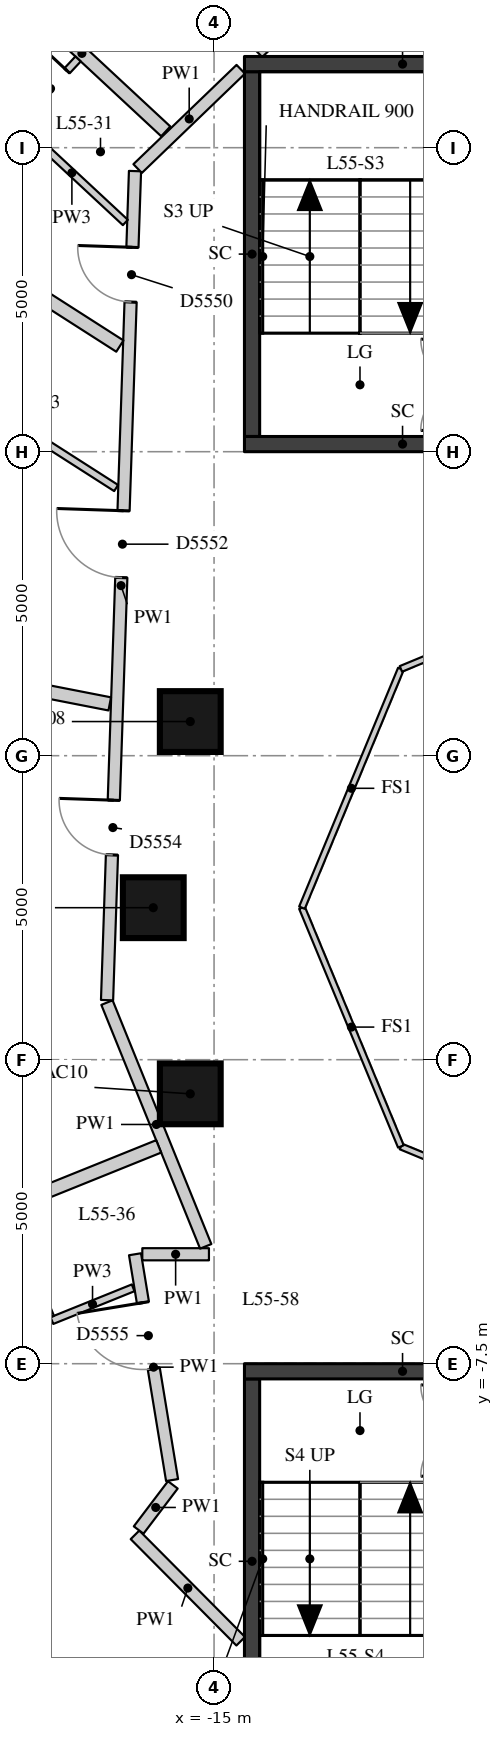
"""IFC4 building model, lengths in metres.
Left out: names, types, materials, properties, quantities, classifications, styles, units other than length and angle.
Written with IfcOpenShell. Run it as: python <this file> out.ifc"""

import sys

from ifc_helpers import new_model, si_unit, direction, frame, frame_2d, origin, origin_2d, place, context, subcontext, project, spatial, rectangle, extrude, element, fill, save


model = new_model("IFC4")
c1 = context("Model", 3, precision=1e-05, world=origin(), true_north=direction((0.0, 1.0)))
c2 = subcontext(c1, "Body", "Model", "MODEL_VIEW")
j1 = project(units=[si_unit("LENGTHUNIT", "METRE"), si_unit("PLANEANGLEUNIT", "RADIAN")], contexts=[c1])
p1 = place(None, origin())
s1 = spatial("IfcSite", under=j1, at=p1, CompositionType="ELEMENT")
p2 = place(p1, origin())
s2 = spatial("IfcBuilding", under=s1, at=p2, CompositionType="ELEMENT")
p3 = place(p2, frame((0.0, 0.0, 195.8)))
s3 = spatial("IfcBuildingStorey", under=s2, at=p3, CompositionType="ELEMENT", Elevation=195.8)
for number, where, z_axis, x_axis in (
    (1, (-15.391, 3.062, 0.0), (0.0, 0.0, 1.0), (1.0, 0.0, 0.0)),
    (2, (-16.0, 0.0, 0.0), (0.0, 0.0, 1.0), (1.0, 0.0, 0.0)),
    (3, (-15.391, -3.062, 0.0), (0.0, 0.0, 1.0), (1.0, 0.0, 0.0)),
):
    element("IfcColumn", number, at=place(p3, frame(where, z_axis=z_axis, x_axis=x_axis)), inside=s3, PredefinedType="COLUMN", context=c2, shape_type="SweptSolid", body=[
        extrude(rectangle(XDim=1.0, YDim=1.0, at=origin_2d()), origin(), (0.0, 0.0, 1.0), 3.3),
    ])
p4 = place(p3, frame((-14.375, 7.75, -0.28), z_axis=(0.0, 0.0, 1.0), x_axis=(0.0, 1.0, 0.0)))
e4 = element("IfcWall", 4, at=p4, inside=s3, PredefinedType="SHEAR", context=c2, shape_type="SweptSolid", body=[
    extrude(rectangle(XDim=6.0, YDim=0.25, at=frame_2d((3.0, 0.0))), origin(), (0.0, 0.0, 1.0), 3.3),
])
for number, where, z_axis, x_axis in (
    (5, (-14.5, 13.875, -0.28), (0.0, 0.0, 1.0), (1.0, 0.0, 0.0)),
    (6, (-14.5, 7.625, -0.28), (0.0, 0.0, 1.0), (1.0, 0.0, 0.0)),
):
    element("IfcWall", number, at=place(p3, frame(where, z_axis=z_axis, x_axis=x_axis)), inside=s3, PredefinedType="SHEAR", context=c2, shape_type="SweptSolid", body=[
        extrude(rectangle(XDim=5.2, YDim=0.25, at=frame_2d((2.6, 0.0))), origin(), (0.0, 0.0, 1.0), 3.3),
    ])
p5 = place(p3, frame((-14.375, -13.75, -0.28), z_axis=(0.0, 0.0, 1.0), x_axis=(0.0, 1.0, 0.0)))
e7 = element("IfcWall", 7, at=p5, inside=s3, PredefinedType="SHEAR", context=c2, shape_type="SweptSolid", body=[
    extrude(rectangle(XDim=6.0, YDim=0.25, at=frame_2d((3.0, 0.0))), origin(), (0.0, 0.0, 1.0), 3.3),
])
p6 = place(p3, frame((-14.5, -7.625, -0.28), z_axis=(0.0, 0.0, 1.0), x_axis=(1.0, 0.0, 0.0)))
e8 = element("IfcWall", 8, at=p6, inside=s3, PredefinedType="SHEAR", context=c2, shape_type="SweptSolid", body=[
    extrude(rectangle(XDim=5.2, YDim=0.25, at=frame_2d((2.6, 0.0))), origin(), (0.0, 0.0, 1.0), 3.3),
])
p7 = place(p3, frame((-14.562, -12.064, 0.0), z_axis=(0.0, 0.0, 1.0), x_axis=(-0.704826289083, 0.709379942074, 0.0)))
e9 = element("IfcWall", 9, at=p7, inside=s3, PredefinedType="PARTITIONING", context=c2, shape_type="SweptSolid", body=[
    extrude(rectangle(XDim=2.466, YDim=0.2, at=frame_2d((1.233, 0.0))), origin(), (0.0, 0.0, 1.0), 3.02),
])
p8 = place(p3, frame((-16.24, -10.236, 0.0), z_axis=(0.0, 0.0, 1.0), x_axis=(0.60389301212, 0.797065386222, 0.0)))
e10 = element("IfcWall", 10, at=p8, inside=s3, PredefinedType="PARTITIONING", context=c2, shape_type="SweptSolid", body=[
    extrude(rectangle(XDim=0.931, YDim=0.2, at=frame_2d((0.466, 0.0))), origin(), (0.0, 0.0, 1.0), 3.02),
])
p9 = place(p3, frame((-15.69, -9.414, 0.0), z_axis=(0.0, 0.0, 1.0), x_axis=(-0.161968669214, 0.986795900981, 0.0)))
e11 = element("IfcWall", 11, at=p9, inside=s3, PredefinedType="PARTITIONING", context=c2, shape_type="SweptSolid", body=[
    extrude(rectangle(XDim=3.764, YDim=0.2, at=frame_2d((1.882, 0.0))), origin(), (0.0, 0.0, 1.0), 3.02),
])
p10 = place(p9, frame((1.858, 0.0, 0.0)))
e12 = element("IfcOpeningElement", 12, at=p10, cuts=e11, PredefinedType="OPENING", context=c2, shape_type="SweptSolid", body=[
    extrude(rectangle(XDim=1.1, YDim=2.1, at=frame_2d((0.55, 1.05))), frame((0.0, 0.11, 0.0), z_axis=(0.0, -1.0, 0.0), x_axis=(1.0, 0.0, 0.0)), (0.0, 0.0, 1.0), 0.22),
])
p11 = place(p3, frame((-16.18, -5.7, 0.0), z_axis=(0.0, 0.0, 1.0), x_axis=(1.0, 0.0, 0.0)))
e13 = element("IfcWall", 13, at=p11, inside=s3, PredefinedType="PARTITIONING", context=c2, shape_type="SweptSolid", body=[
    extrude(rectangle(XDim=1.096, YDim=0.2, at=frame_2d((0.548, 0.0))), origin(), (0.0, 0.0, 1.0), 3.02),
])
p12 = place(p3, frame((-15.137, -5.57, 0.0), z_axis=(0.0, 0.0, 1.0), x_axis=(-0.375464059939, 0.926836954213, 0.0)))
e14 = element("IfcWall", 14, at=p12, inside=s3, PredefinedType="PARTITIONING", context=c2, shape_type="SweptSolid", body=[
    extrude(rectangle(XDim=4.326, YDim=0.2, at=frame_2d((2.163, 0.0))), origin(), (0.0, 0.0, 1.0), 3.02),
])
p13 = place(p3, frame((-16.76, -1.521, 0.0), z_axis=(0.0, 0.0, 1.0), x_axis=(0.033695560079, 0.999432143385, 0.0)))
e15 = element("IfcWall", 15, at=p13, inside=s3, PredefinedType="PARTITIONING", context=c2, shape_type="SweptSolid", body=[
    extrude(rectangle(XDim=13.643, YDim=0.2, at=frame_2d((6.822, 0.0))), origin(), (0.0, 0.0, 1.0), 3.02),
])
p14 = place(p13, frame((11.489, 0.0, 0.0)))
e16 = element("IfcOpeningElement", 16, at=p14, cuts=e15, PredefinedType="OPENING", context=c2, shape_type="SweptSolid", body=[
    extrude(rectangle(XDim=0.9, YDim=2.1, at=frame_2d((0.45, 1.05))), frame((0.0, 0.11, 0.0), z_axis=(0.0, -1.0, 0.0), x_axis=(1.0, 0.0, 0.0)), (0.0, 0.0, 1.0), 0.22),
])
p15 = place(p13, frame((6.954, 0.0, 0.0)))
e17 = element("IfcOpeningElement", 17, at=p15, cuts=e15, PredefinedType="OPENING", context=c2, shape_type="SweptSolid", body=[
    extrude(rectangle(XDim=1.1, YDim=2.1, at=frame_2d((0.55, 1.05))), frame((0.0, 0.11, 0.0), z_axis=(0.0, -1.0, 0.0), x_axis=(1.0, 0.0, 0.0)), (0.0, 0.0, 1.0), 0.22),
])
p16 = place(p13, frame((2.39, 0.0, 0.0)))
e18 = element("IfcOpeningElement", 18, at=p16, cuts=e15, PredefinedType="OPENING", context=c2, shape_type="SweptSolid", body=[
    extrude(rectangle(XDim=0.9, YDim=2.1, at=frame_2d((0.45, 1.05))), frame((0.0, 0.11, 0.0), z_axis=(0.0, -1.0, 0.0), x_axis=(1.0, 0.0, 0.0)), (0.0, 0.0, 1.0), 0.22),
])
p17 = place(p3, frame((-16.257, 12.157, 0.0), z_axis=(0.0, 0.0, 1.0), x_axis=(0.720356671174, 0.693603825174, 0.0)))
e19 = element("IfcWall", 19, at=p17, inside=s3, PredefinedType="PARTITIONING", context=c2, shape_type="SweptSolid", body=[
    extrude(rectangle(XDim=2.354, YDim=0.2, at=frame_2d((1.177, 0.0))), origin(), (0.0, 0.0, 1.0), 3.02),
])
p18 = place(p3, frame((-14.278, 14.062, 0.0), z_axis=(0.0, 0.0, 1.0), x_axis=(0.720213092954, 0.693752910435, 0.0)))
e20 = element("IfcWall", 20, at=p18, inside=s3, PredefinedType="PARTITIONING", context=c2, shape_type="SweptSolid", body=[
    extrude(rectangle(XDim=1.476, YDim=0.2, at=frame_2d((0.738, 0.0))), origin(), (0.0, 0.0, 1.0), 3.02),
])
p19 = place(p3, frame((-18.553, 15.334, 0.0), z_axis=(0.0, 0.0, 1.0), x_axis=(0.732303975018, -0.680977891105, 0.0)))
e21 = element("IfcWall", 21, at=p19, inside=s3, PredefinedType="PARTITIONING", context=c2, shape_type="SweptSolid", body=[
    extrude(rectangle(XDim=3.767, YDim=0.22, at=frame_2d((1.884, 0.0))), origin(), (0.0, 0.0, 1.0), 2.57),
])
p20 = place(p3, frame((-21.055, 12.121, 0.0), z_axis=(0.0, 0.0, 1.0), x_axis=(0.842281345898, -0.539038156675, 0.0)))
e22 = element("IfcWall", 22, at=p20, inside=s3, PredefinedType="PARTITIONING", context=c2, shape_type="SweptSolid", body=[
    extrude(rectangle(XDim=5.35, YDim=0.22, at=frame_2d((2.675, 0.0))), origin(), (0.0, 0.0, 1.0), 3.02),
])
p21 = place(p3, frame((-22.697, 4.521, 0.0), z_axis=(0.0, 0.0, 1.0), x_axis=(0.981441525081, -0.19176165635, 0.0)))
e23 = element("IfcWall", 23, at=p21, inside=s3, PredefinedType="PARTITIONING", context=c2, shape_type="SweptSolid", body=[
    extrude(rectangle(XDim=6.094, YDim=0.22, at=frame_2d((3.047, 0.0))), origin(), (0.0, 0.0, 1.0), 2.47),
])
p22 = place(p3, frame((-21.651, -6.241, 0.0), z_axis=(0.0, 0.0, 1.0), x_axis=(0.927381885483, 0.374116076208, 0.0)))
e24 = element("IfcWall", 24, at=p22, inside=s3, PredefinedType="PARTITIONING", context=c2, shape_type="SweptSolid", body=[
    extrude(rectangle(XDim=6.19, YDim=0.22, at=frame_2d((3.095, 0.0))), origin(), (0.0, 0.0, 1.0), 3.02),
])
p23 = place(p3, frame((-16.459, 11.27, 0.0), z_axis=(0.0, 0.0, 1.0), x_axis=(-0.732311710068, 0.68096957296, 0.0)))
e25 = element("IfcWall", 25, at=p23, inside=s3, PredefinedType="PARTITIONING", context=c2, shape_type="SweptSolid", body=[
    extrude(rectangle(XDim=2.401, YDim=0.12, at=frame_2d((1.201, 0.0))), origin(), (0.0, 0.0, 1.0), 3.02),
])
p24 = place(p3, frame((-16.61, 6.902, 0.0), z_axis=(0.0, 0.0, 1.0), x_axis=(-0.842288763401, 0.539026566181, 0.0)))
e26 = element("IfcWall", 26, at=p24, inside=s3, PredefinedType="PARTITIONING", context=c2, shape_type="SweptSolid", body=[
    extrude(rectangle(XDim=3.83, YDim=0.12, at=frame_2d((1.915, 0.0))), origin(), (0.0, 0.0, 1.0), 3.02),
])
p25 = place(p3, frame((-16.331, -6.252, 0.0), z_axis=(0.0, 0.0, 1.0), x_axis=(-0.927409233125, -0.374048278053, 0.0)))
e27 = element("IfcWall", 27, at=p25, inside=s3, PredefinedType="PARTITIONING", context=c2, shape_type="SweptSolid", body=[
    extrude(rectangle(XDim=1.44, YDim=0.12, at=frame_2d((0.72, 0.0))), origin(), (0.0, 0.0, 1.0), 3.02),
])
p26 = place(p3, frame((-18.177, 12.949, 0.0), z_axis=(0.0, 0.0, 1.0), x_axis=(0.681081886823, 0.732207254431, 0.0)))
e28 = element("IfcWall", 28, at=p26, inside=s3, PredefinedType="PARTITIONING", context=c2, shape_type="SweptSolid", body=[
    extrude(rectangle(XDim=1.38, YDim=0.12, at=frame_2d((0.69, 0.0))), origin(), (0.0, 0.0, 1.0), 3.02),
])
p27 = place(p26, frame((0.315, 0.0, 0.0)))
e29 = element("IfcOpeningElement", 29, at=p27, cuts=e28, PredefinedType="OPENING", context=c2, shape_type="SweptSolid", body=[
    extrude(rectangle(XDim=0.8, YDim=2.1, at=frame_2d((0.4, 1.05))), frame((0.0, 0.07, 0.0), z_axis=(0.0, -1.0, 0.0), x_axis=(1.0, 0.0, 0.0)), (0.0, 0.0, 1.0), 0.14),
])
p28 = place(p3, frame((-17.689, -6.735, 0.0), z_axis=(0.0, 0.0, 1.0), x_axis=(-0.374057168462, 0.927405647342, 0.0)))
e30 = element("IfcWall", 30, at=p28, inside=s3, PredefinedType="PARTITIONING", context=c2, shape_type="SweptSolid", body=[
    extrude(rectangle(XDim=1.83, YDim=0.12, at=frame_2d((0.915, 0.0))), origin(), (0.0, 0.0, 1.0), 3.02),
])
p29 = place(p28, frame((0.54, 0.0, 0.0)))
e31 = element("IfcOpeningElement", 31, at=p29, cuts=e30, PredefinedType="OPENING", context=c2, shape_type="SweptSolid", body=[
    extrude(rectangle(XDim=0.8, YDim=2.1, at=frame_2d((0.4, 1.05))), frame((0.0, 0.07, 0.0), z_axis=(0.0, -1.0, 0.0), x_axis=(1.0, 0.0, 0.0)), (0.0, 0.0, 1.0), 0.14),
])
for number, where, z_axis, x_axis in (
    (32, (-8.0, -5.554, 0.0), (0.0, 0.0, 1.0), (-0.924, 0.383, 0.0)),
    (33, (-11.927, -3.927, 0.0), (0.0, 0.0, 1.0), (-0.383, 0.924, 0.0)),
    (34, (-13.554, 0.0, 0.0), (0.0, 0.0, 1.0), (0.383, 0.924, 0.0)),
    (35, (-11.927, 3.927, 0.0), (0.0, 0.0, 1.0), (0.924, 0.383, 0.0)),
):
    element("IfcWall", number, at=place(p3, frame(where, z_axis=z_axis, x_axis=x_axis)), inside=s3, PredefinedType="PARTITIONING", context=c2, shape_type="SweptSolid", body=[
        extrude(rectangle(XDim=4.251, YDim=0.1, at=frame_2d((2.125, 0.0))), origin(), (0.0, 0.0, 1.0), 3.02),
    ])
p30 = place(p14, origin())
e36 = element("IfcDoor", 36, at=p30, inside=s3, OperationType="SINGLE_SWING_RIGHT", PredefinedType="DOOR", context=c2, shape_type="SweptSolid", body=[
    extrude(rectangle(XDim=0.9, YDim=2.1, at=frame_2d((0.45, 1.05))), frame((0.0, 0.025, 0.0), z_axis=(0.0, -1.0, 0.0), x_axis=(1.0, 0.0, 0.0)), (0.0, 0.0, 1.0), 0.05),
])
fill(e16, e36)
p31 = place(p27, origin())
e37 = element("IfcDoor", 37, at=p31, inside=s3, OperationType="SINGLE_SWING_RIGHT", PredefinedType="DOOR", context=c2, shape_type="SweptSolid", body=[
    extrude(rectangle(XDim=0.8, YDim=2.1, at=frame_2d((0.4, 1.05))), frame((0.0, 0.025, 0.0), z_axis=(0.0, -1.0, 0.0), x_axis=(1.0, 0.0, 0.0)), (0.0, 0.0, 1.0), 0.05),
])
fill(e29, e37)
p32 = place(p15, origin())
e38 = element("IfcDoor", 38, at=p32, inside=s3, OperationType="SINGLE_SWING_RIGHT", PredefinedType="DOOR", context=c2, shape_type="SweptSolid", body=[
    extrude(rectangle(XDim=1.1, YDim=2.1, at=frame_2d((0.55, 1.05))), frame((0.0, 0.025, 0.0), z_axis=(0.0, -1.0, 0.0), x_axis=(1.0, 0.0, 0.0)), (0.0, 0.0, 1.0), 0.05),
])
fill(e17, e38)
p33 = place(p16, origin())
e39 = element("IfcDoor", 39, at=p33, inside=s3, OperationType="SINGLE_SWING_RIGHT", PredefinedType="DOOR", context=c2, shape_type="SweptSolid", body=[
    extrude(rectangle(XDim=0.9, YDim=2.1, at=frame_2d((0.45, 1.05))), frame((0.0, 0.025, 0.0), z_axis=(0.0, -1.0, 0.0), x_axis=(1.0, 0.0, 0.0)), (0.0, 0.0, 1.0), 0.05),
])
fill(e18, e39)
p34 = place(p10, origin())
e40 = element("IfcDoor", 40, at=p34, inside=s3, OperationType="SINGLE_SWING_RIGHT", PredefinedType="DOOR", context=c2, shape_type="SweptSolid", body=[
    extrude(rectangle(XDim=1.1, YDim=2.1, at=frame_2d((0.55, 1.05))), frame((0.0, 0.025, 0.0), z_axis=(0.0, -1.0, 0.0), x_axis=(1.0, 0.0, 0.0)), (0.0, 0.0, 1.0), 0.05),
])
fill(e12, e40)
save(model, sys.argv[1])
